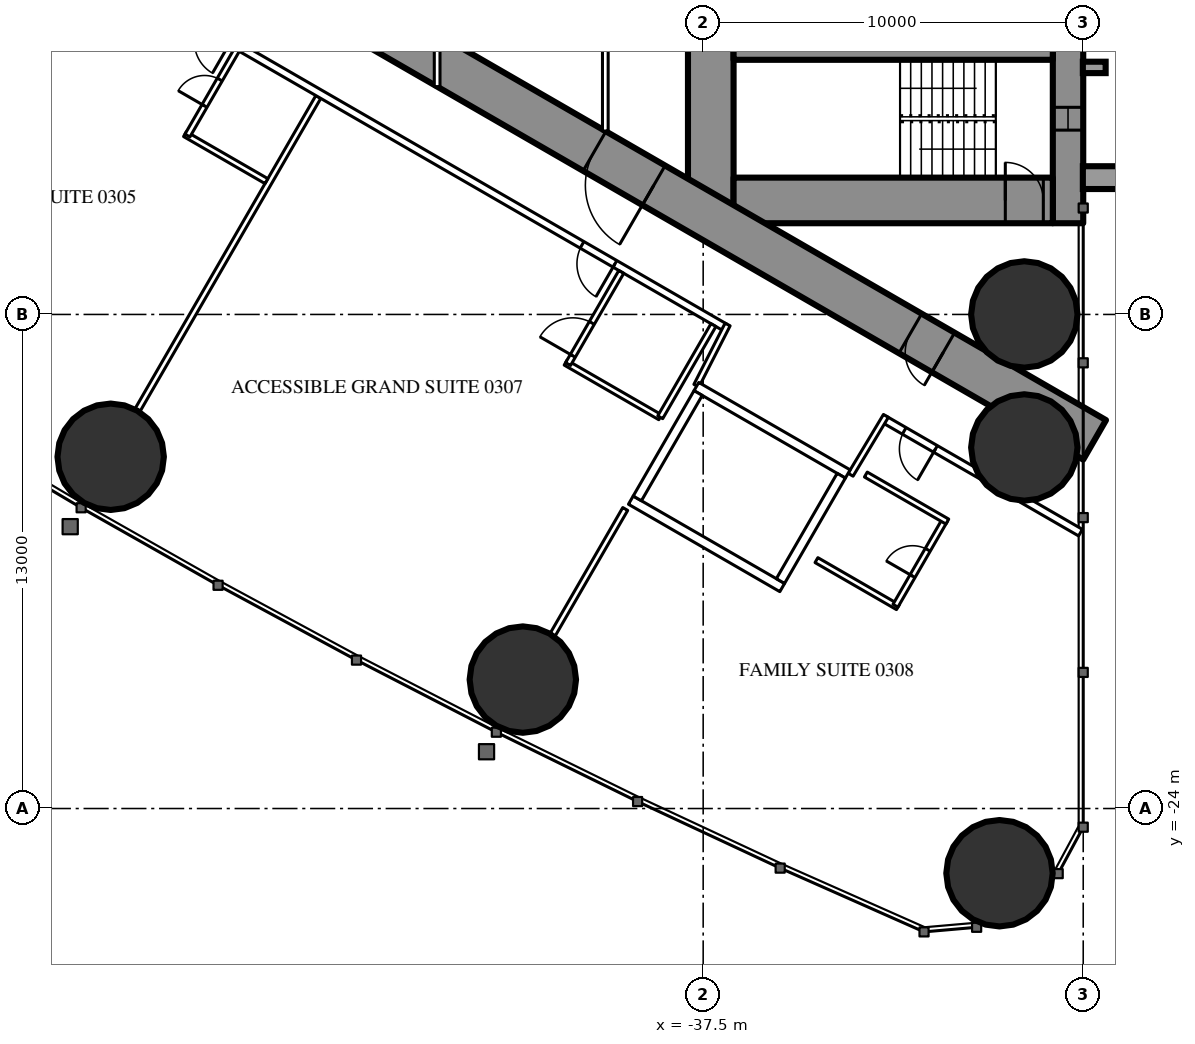
"""IFC4 building model, lengths in metres.
Left out: names, types, materials, properties, quantities, classifications, styles, units other than length and angle.
Written with IfcOpenShell. Run it as: python <this file> out.ifc"""

import sys

from ifc_helpers import new_model, si_unit, direction, frame, frame_2d, origin, origin_2d, place, context, subcontext, project, spatial, rectangle, hollow_circle, extrude, element, fill, save


model = new_model("IFC4")
c1 = context("Model", 3, precision=1e-05, world=origin(), true_north=direction((0.0, 1.0)))
c2 = subcontext(c1, "Body", "Model", "MODEL_VIEW")
j1 = project(units=[si_unit("LENGTHUNIT", "METRE"), si_unit("PLANEANGLEUNIT", "RADIAN")], contexts=[c1])
p1 = place(None, origin())
s1 = spatial("IfcSite", under=j1, at=p1, CompositionType="ELEMENT")
p2 = place(p1, origin())
s2 = spatial("IfcBuilding", under=s1, at=p2, CompositionType="ELEMENT")
p3 = place(p2, frame((0.0, 0.0, 18.0)))
s3 = spatial("IfcBuildingStorey", under=s2, at=p3, CompositionType="ELEMENT", Elevation=18.0)
for number, where, z_axis, x_axis in (
    (1, (-29.703, -25.703, 0.0), (0.0, 0.0, 1.0), (1.0, 0.0, 0.0)),
    (2, (-29.05, -11.0, 0.0), (0.0, 0.0, 1.0), (1.0, 0.0, 0.0)),
    (3, (-29.05, -14.5, 0.0), (0.0, 0.0, 1.0), (1.0, 0.0, 0.0)),
    (4, (-53.09, -14.745, 0.0), (0.0, 0.0, 1.0), (1.0, 0.0, 0.0)),
    (5, (-42.245, -20.607, 0.0), (0.0, 0.0, 1.0), (1.0, 0.0, 0.0)),
):
    element("IfcColumn", number, at=place(p3, frame(where, z_axis=z_axis, x_axis=x_axis)), inside=s3, PredefinedType="COLUMN", context=c2, shape_type="SweptSolid", body=[
        extrude(hollow_circle(Radius=1.4, WallThickness=0.12, at=origin_2d()), origin(), (0.0, 0.0, 1.0), 3.5),
    ])
p4 = place(p3, frame((-27.9, 8.6, 0.0), z_axis=(0.0, 0.0, 1.0), x_axis=(0.0, -1.0, 0.0)))
e6 = element("IfcWall", 6, at=p4, inside=s3, PredefinedType="SHEAR", context=c2, shape_type="SweptSolid", body=[
    extrude(rectangle(XDim=17.2, YDim=0.8, at=frame_2d((8.6, 0.0))), origin(), (0.0, 0.0, 1.0), 3.5),
])
p5 = place(p4, frame((2.45, 0.0, 0.6)))
e7 = element("IfcOpeningElement", 7, at=p5, cuts=e6, PredefinedType="OPENING", context=c2, shape_type="SweptSolid", body=[
    extrude(rectangle(XDim=0.6, YDim=2.1, at=frame_2d((0.3, 1.05))), frame((0.0, 0.41, 0.0), z_axis=(0.0, -1.0, 0.0), x_axis=(1.0, 0.0, 0.0)), (0.0, 0.0, 1.0), 0.82),
])
p6 = place(p4, frame((14.15, 0.0, 0.6)))
e8 = element("IfcOpeningElement", 8, at=p6, cuts=e6, PredefinedType="OPENING", context=c2, shape_type="SweptSolid", body=[
    extrude(rectangle(XDim=0.6, YDim=2.1, at=frame_2d((0.3, 1.05))), frame((0.0, 0.41, 0.0), z_axis=(0.0, -1.0, 0.0), x_axis=(1.0, 0.0, 0.0)), (0.0, 0.0, 1.0), 0.82),
])
p7 = place(p3, frame((-37.3, 8.6, 0.0), z_axis=(0.0, 0.0, 1.0), x_axis=(0.0, -1.0, 0.0)))
e9 = element("IfcWall", 9, at=p7, inside=s3, PredefinedType="SHEAR", context=c2, shape_type="SweptSolid", body=[
    extrude(rectangle(XDim=17.2, YDim=1.2, at=frame_2d((8.6, 0.0))), origin(), (0.0, 0.0, 1.0), 3.5),
])
p8 = place(p7, frame((7.7, 0.0, 0.0)))
e10 = element("IfcOpeningElement", 10, at=p8, cuts=e9, PredefinedType="OPENING", context=c2, shape_type="SweptSolid", body=[
    extrude(rectangle(XDim=1.8, YDim=2.2, at=frame_2d((0.9, 1.1))), frame((0.0, 0.61, 0.0), z_axis=(0.0, -1.0, 0.0), x_axis=(1.0, 0.0, 0.0)), (0.0, 0.0, 1.0), 1.22),
])
p9 = place(p3, frame((-28.3, -8.0, 0.0), z_axis=(0.0, 0.0, 1.0), x_axis=(-1.0, 0.0, 0.0)))
e11 = element("IfcWall", 11, at=p9, inside=s3, PredefinedType="SHEAR", context=c2, shape_type="SweptSolid", body=[
    extrude(rectangle(XDim=8.4, YDim=1.2, at=frame_2d((4.2, 0.0))), origin(), (0.0, 0.0, 1.0), 3.5),
])
p10 = place(p9, frame((0.25, 0.0, 0.0)))
e12 = element("IfcOpeningElement", 12, at=p10, cuts=e11, PredefinedType="OPENING", context=c2, shape_type="SweptSolid", body=[
    extrude(rectangle(XDim=1.0, YDim=2.2, at=frame_2d((0.5, 1.1))), frame((0.0, 0.61, 0.0), z_axis=(0.0, -1.0, 0.0), x_axis=(1.0, 0.0, 0.0)), (0.0, 0.0, 1.0), 1.22),
])
p11 = place(p3, frame((-28.3, -4.15, 0.0), z_axis=(0.0, 0.0, 1.0), x_axis=(-1.0, 0.0, 0.0)))
e13 = element("IfcWall", 13, at=p11, inside=s3, PredefinedType="SHEAR", context=c2, shape_type="SweptSolid", body=[
    extrude(rectangle(XDim=8.4, YDim=0.3, at=frame_2d((4.2, 0.0))), origin(), (0.0, 0.0, 1.0), 3.5),
])
p12 = place(p3, frame((-27.2, -14.3, 0.0), z_axis=(0.0, 0.0, 1.0), x_axis=(-0.866024021859, 0.500002393557, 0.0)))
e14 = element("IfcWall", 14, at=p12, inside=s3, PredefinedType="SHEAR", context=c2, shape_type="SweptSolid", body=[
    extrude(rectangle(XDim=27.907, YDim=1.2, at=frame_2d((13.954, 0.0))), origin(), (0.0, 0.0, 1.0), 3.5),
])
p13 = place(p12, frame((4.6, 0.0, 0.0)))
e15 = element("IfcOpeningElement", 15, at=p13, cuts=e14, PredefinedType="OPENING", context=c2, shape_type="SweptSolid", body=[
    extrude(rectangle(XDim=1.0, YDim=2.2, at=frame_2d((0.5, 1.1))), frame((0.0, 0.61, 0.0), z_axis=(0.0, -1.0, 0.0), x_axis=(1.0, 0.0, 0.0)), (0.0, 0.0, 1.0), 1.22),
])
p14 = place(p12, frame((13.395, 0.0, 0.0)))
e16 = element("IfcOpeningElement", 16, at=p14, cuts=e14, PredefinedType="OPENING", context=c2, shape_type="SweptSolid", body=[
    extrude(rectangle(XDim=1.8, YDim=2.2, at=frame_2d((0.9, 1.1))), frame((0.0, 0.61, 0.0), z_axis=(0.0, -1.0, 0.0), x_axis=(1.0, 0.0, 0.0)), (0.0, 0.0, 1.0), 1.22),
])
p15 = place(p3, frame((-47.627, -5.278, 0.0), z_axis=(0.0, 0.0, 1.0), x_axis=(-0.500009844318, -0.86601972009, 0.0)))
e17 = element("IfcWall", 17, at=p15, inside=s3, PredefinedType="PARTITIONING", context=c2, shape_type="SweptSolid", body=[
    extrude(rectangle(XDim=9.51, YDim=0.15, at=frame_2d((4.755, 0.0))), origin(), (0.0, 0.0, 1.0), 2.25),
])
p16 = place(p3, frame((-39.551, -16.118, 0.0), z_axis=(0.0, 0.0, 1.0), x_axis=(-0.499986503906, -0.866033195618, 0.0)))
e18 = element("IfcWall", 18, at=p16, inside=s3, PredefinedType="PARTITIONING", context=c2, shape_type="SweptSolid", body=[
    extrude(rectangle(XDim=3.815, YDim=0.15, at=frame_2d((1.907, 0.0))), origin(), (0.0, 0.0, 1.0), 3.25),
])
p17 = place(p3, frame((-27.572, -16.741, 0.0), z_axis=(0.0, 0.0, 1.0), x_axis=(-0.866024464444, 0.500001626982, 0.0)))
e19 = element("IfcWall", 19, at=p17, inside=s3, PredefinedType="PARTITIONING", context=c2, shape_type="SweptSolid", body=[
    extrude(rectangle(XDim=5.955, YDim=0.2, at=frame_2d((2.978, 0.0))), origin(), (0.0, 0.0, 1.0), 3.25),
])
p18 = place(p17, frame((4.405, 0.0, 0.0)))
e20 = element("IfcOpeningElement", 20, at=p18, cuts=e19, PredefinedType="OPENING", context=c2, shape_type="SweptSolid", body=[
    extrude(rectangle(XDim=0.95, YDim=2.2, at=frame_2d((0.475, 1.1))), frame((0.0, 0.11, 0.0), z_axis=(0.0, -1.0, 0.0), x_axis=(1.0, 0.0, 0.0)), (0.0, 0.0, 1.0), 0.22),
])
p19 = place(p3, frame((-36.92, -11.344, 0.0), z_axis=(0.0, 0.0, 1.0), x_axis=(-0.866028313256, 0.499994960614, 0.0)))
e21 = element("IfcWall", 21, at=p19, inside=s3, PredefinedType="PARTITIONING", context=c2, shape_type="SweptSolid", body=[
    extrude(rectangle(XDim=22.568, YDim=0.2, at=frame_2d((11.284, 0.0))), origin(), (0.0, 0.0, 1.0), 3.25),
])
p20 = place(p19, frame((15.03, 0.0, 0.0)))
e22 = element("IfcOpeningElement", 22, at=p20, cuts=e21, PredefinedType="OPENING", context=c2, shape_type="SweptSolid", body=[
    extrude(rectangle(XDim=0.95, YDim=2.2, at=frame_2d((0.475, 1.1))), frame((0.0, 0.11, 0.0), z_axis=(0.0, -1.0, 0.0), x_axis=(1.0, 0.0, 0.0)), (0.0, 0.0, 1.0), 0.22),
])
p21 = place(p19, frame((3.35, 0.0, 0.0)))
e23 = element("IfcOpeningElement", 23, at=p21, cuts=e21, PredefinedType="OPENING", context=c2, shape_type="SweptSolid", body=[
    extrude(rectangle(XDim=1.0, YDim=2.2, at=frame_2d((0.5, 1.1))), frame((0.0, 0.11, 0.0), z_axis=(0.0, -1.0, 0.0), x_axis=(1.0, 0.0, 0.0)), (0.0, 0.0, 1.0), 0.22),
])
p22 = place(p3, frame((-36.857, -11.265, 0.0), z_axis=(0.0, 0.0, 1.0), x_axis=(-0.454225294761, -0.890886851176, 0.0)))
e24 = element("IfcWall", 24, at=p22, inside=s3, PredefinedType="PARTITIONING", context=c2, shape_type="SweptSolid", body=[
    extrude(rectangle(XDim=1.807, YDim=0.15, at=frame_2d((0.904, 0.0))), origin(), (0.0, 0.0, 1.0), 3.25),
])
p23 = place(p3, frame((-33.621, -15.218, 0.0), z_axis=(0.0, 0.0, 1.0), x_axis=(0.514336634837, 0.857588377991, 0.0)))
e25 = element("IfcWall", 25, at=p23, inside=s3, PredefinedType="PARTITIONING", context=c2, shape_type="SweptSolid", body=[
    extrude(rectangle(XDim=1.805, YDim=0.15, at=frame_2d((0.903, 0.0))), origin(), (0.0, 0.0, 1.0), 3.25),
])
p24 = place(p3, frame((-48.992, -7.492, 0.0), z_axis=(0.0, 0.0, 1.0), x_axis=(-0.866031185235, 0.4999899861, 0.0)))
e26 = element("IfcWall", 26, at=p24, inside=s3, PredefinedType="PARTITIONING", context=c2, shape_type="SweptSolid", body=[
    extrude(rectangle(XDim=2.475, YDim=0.15, at=frame_2d((1.238, 0.0))), origin(), (0.0, 0.0, 1.0), 3.25),
])
p25 = place(p3, frame((-49.77, -4.04, 0.0), z_axis=(0.0, 0.0, 1.0), x_axis=(-0.500006934395, -0.866021400173, 0.0)))
e27 = element("IfcWall", 27, at=p25, inside=s3, PredefinedType="PARTITIONING", context=c2, shape_type="SweptSolid", body=[
    extrude(rectangle(XDim=2.6, YDim=0.15, at=frame_2d((1.3, 0.0))), origin(), (0.0, 0.0, 1.0), 3.25),
])
p26 = place(p25, frame((0.9, 0.0, 0.0)))
e28 = element("IfcOpeningElement", 28, at=p26, cuts=e27, PredefinedType="OPENING", context=c2, shape_type="SweptSolid", body=[
    extrude(rectangle(XDim=0.8, YDim=2.2, at=frame_2d((0.4, 1.1))), frame((0.0, 0.085, 0.0), z_axis=(0.0, -1.0, 0.0), x_axis=(1.0, 0.0, 0.0)), (0.0, 0.0, 1.0), 0.17),
])
p27 = place(p3, frame((-38.63, -13.705, 0.0), z_axis=(0.0, 0.0, 1.0), x_axis=(-0.866018712932, 0.500011588718, 0.0)))
e29 = element("IfcWall", 29, at=p27, inside=s3, PredefinedType="PARTITIONING", context=c2, shape_type="SweptSolid", body=[
    extrude(rectangle(XDim=2.875, YDim=0.15, at=frame_2d((1.438, 0.0))), origin(), (0.0, 0.0, 1.0), 3.25),
])
p28 = place(p3, frame((-39.655, -9.88, 0.0), z_axis=(0.0, 0.0, 1.0), x_axis=(-0.500049511043, -0.865996816683, 0.0)))
e30 = element("IfcWall", 30, at=p28, inside=s3, PredefinedType="PARTITIONING", context=c2, shape_type="SweptSolid", body=[
    extrude(rectangle(XDim=2.8, YDim=0.15, at=frame_2d((1.4, 0.0))), origin(), (0.0, 0.0, 1.0), 3.25),
])
p29 = place(p28, frame((1.55, 0.0, 0.0)))
e31 = element("IfcOpeningElement", 31, at=p29, cuts=e30, PredefinedType="OPENING", context=c2, shape_type="SweptSolid", body=[
    extrude(rectangle(XDim=1.0, YDim=2.2, at=frame_2d((0.5, 1.1))), frame((0.0, 0.085, 0.0), z_axis=(0.0, -1.0, 0.0), x_axis=(1.0, 0.0, 0.0)), (0.0, 0.0, 1.0), 0.17),
])
p30 = place(p3, frame((-37.23, -11.281, 0.0), z_axis=(0.0, 0.0, 1.0), x_axis=(-0.500049511043, -0.865996816683, 0.0)))
e32 = element("IfcWall", 32, at=p30, inside=s3, PredefinedType="PARTITIONING", context=c2, shape_type="SweptSolid", body=[
    extrude(rectangle(XDim=2.8, YDim=0.15, at=frame_2d((1.4, 0.0))), origin(), (0.0, 0.0, 1.0), 3.25),
])
p31 = place(p3, frame((-32.376, -18.702, 0.0), z_axis=(0.0, 0.0, 1.0), x_axis=(-0.866006523861, 0.500032699561, 0.0)))
e33 = element("IfcWall", 33, at=p31, inside=s3, PredefinedType="PARTITIONING", context=c2, shape_type="SweptSolid", body=[
    extrude(rectangle(XDim=2.475, YDim=0.15, at=frame_2d((1.237, 0.0))), origin(), (0.0, 0.0, 1.0), 3.25),
])
p32 = place(p3, frame((-31.141, -16.413, 0.0), z_axis=(0.0, 0.0, 1.0), x_axis=(-0.500006934395, -0.866021400173, 0.0)))
e34 = element("IfcWall", 34, at=p32, inside=s3, PredefinedType="PARTITIONING", context=c2, shape_type="SweptSolid", body=[
    extrude(rectangle(XDim=2.6, YDim=0.15, at=frame_2d((1.3, 0.0))), origin(), (0.0, 0.0, 1.0), 3.25),
])
p33 = place(p32, frame((0.9, 0.0, 0.0)))
e35 = element("IfcOpeningElement", 35, at=p33, cuts=e34, PredefinedType="OPENING", context=c2, shape_type="SweptSolid", body=[
    extrude(rectangle(XDim=0.8, YDim=2.2, at=frame_2d((0.4, 1.1))), frame((0.0, 0.085, 0.0), z_axis=(0.0, -1.0, 0.0), x_axis=(1.0, 0.0, 0.0)), (0.0, 0.0, 1.0), 0.17),
])
p34 = place(p3, frame((-31.076, -16.45, 0.0), z_axis=(0.0, 0.0, 1.0), x_axis=(-0.866073894602, 0.499916002032, 0.0)))
e36 = element("IfcWall", 36, at=p34, inside=s3, PredefinedType="PARTITIONING", context=c2, shape_type="SweptSolid", body=[
    extrude(rectangle(XDim=2.475, YDim=0.15, at=frame_2d((1.238, 0.0))), origin(), (0.0, 0.0, 1.0), 3.25),
])
p35 = place(p3, frame((-40.075, 1.2, 0.0), z_axis=(0.0, 0.0, 1.0), x_axis=(0.0, -1.0, 0.0)))
e37 = element("IfcWall", 37, at=p35, inside=s3, PredefinedType="PARTITIONING", context=c2, shape_type="SweptSolid", body=[
    extrude(rectangle(XDim=7.374, YDim=0.15, at=frame_2d((3.687, 0.0))), origin(), (0.0, 0.0, 1.0), 3.25),
])
p36 = place(p35, frame((2.787, 0.0, 0.0)))
e38 = element("IfcOpeningElement", 38, at=p36, cuts=e37, PredefinedType="OPENING", context=c2, shape_type="SweptSolid", body=[
    extrude(rectangle(XDim=1.8, YDim=2.2, at=frame_2d((0.9, 1.1))), frame((0.0, 0.085, 0.0), z_axis=(0.0, -1.0, 0.0), x_axis=(1.0, 0.0, 0.0)), (0.0, 0.0, 1.0), 0.17),
])
p37 = place(p3, frame((-44.5, 5.005, 0.0), z_axis=(0.0, 0.0, 1.0), x_axis=(0.0, -1.0, 0.0)))
e39 = element("IfcWall", 39, at=p37, inside=s3, PredefinedType="PARTITIONING", context=c2, shape_type="SweptSolid", body=[
    extrude(rectangle(XDim=10.009, YDim=0.15, at=frame_2d((5.005, 0.0))), origin(), (0.0, 0.0, 1.0), 2.35),
])
p38 = place(p37, frame((2.002, 0.0, 0.0)))
e40 = element("IfcOpeningElement", 40, at=p38, cuts=e39, PredefinedType="OPENING", context=c2, shape_type="SweptSolid", body=[
    extrude(rectangle(XDim=1.0, YDim=2.2, at=frame_2d((0.5, 1.1))), frame((0.0, 0.085, 0.0), z_axis=(0.0, -1.0, 0.0), x_axis=(1.0, 0.0, 0.0)), (0.0, 0.0, 1.0), 0.17),
])
p39 = place(p37, frame((7.007, 0.0, 0.0)))
e41 = element("IfcOpeningElement", 41, at=p39, cuts=e39, PredefinedType="OPENING", context=c2, shape_type="SweptSolid", body=[
    extrude(rectangle(XDim=1.0, YDim=2.2, at=frame_2d((0.5, 1.1))), frame((0.0, 0.085, 0.0), z_axis=(0.0, -1.0, 0.0), x_axis=(1.0, 0.0, 0.0)), (0.0, 0.0, 1.0), 0.17),
])
p40 = place(p3, frame((-33.696, -15.197, 0.0), z_axis=(0.0, 0.0, 1.0), x_axis=(-0.865976953817, 0.500083908417, 0.0)))
e42 = element("IfcWall", 42, at=p40, inside=s3, PredefinedType="PARTITIONING", context=c2, shape_type="SweptSolid", body=[
    extrude(rectangle(XDim=4.599, YDim=0.25, at=frame_2d((2.3, 0.0))), origin(), (0.0, 0.0, 1.0), 3.25),
])
p41 = place(p3, frame((-35.42, -18.186, 0.0), z_axis=(0.0, 0.0, 1.0), x_axis=(-0.865990227814, 0.50006092162, 0.0)))
e43 = element("IfcWall", 43, at=p41, inside=s3, PredefinedType="PARTITIONING", context=c2, shape_type="SweptSolid", body=[
    extrude(rectangle(XDim=4.6, YDim=0.25, at=frame_2d((2.3, 0.0))), origin(), (0.0, 0.0, 1.0), 3.25),
])
p42 = place(p3, frame((-33.866, -15.243, 0.0), z_axis=(0.0, 0.0, 1.0), x_axis=(-0.499929347863, -0.866066190972, 0.0)))
e44 = element("IfcWall", 44, at=p42, inside=s3, PredefinedType="PARTITIONING", context=c2, shape_type="SweptSolid", body=[
    extrude(rectangle(XDim=3.201, YDim=0.25, at=frame_2d((1.6, 0.0))), origin(), (0.0, 0.0, 1.0), 3.25),
])
p43 = place(p3, frame((-37.633, -13.068, 0.0), z_axis=(0.0, 0.0, 1.0), x_axis=(-0.499872130319, -0.866099216793, 0.0)))
e45 = element("IfcWall", 45, at=p43, inside=s3, PredefinedType="PARTITIONING", context=c2, shape_type="SweptSolid", body=[
    extrude(rectangle(XDim=3.2, YDim=0.25, at=frame_2d((1.6, 0.0))), origin(), (0.0, 0.0, 1.0), 3.25),
])
p44 = place(p26, origin())
e46 = element("IfcDoor", 46, at=p44, inside=s3, OperationType="SINGLE_SWING_RIGHT", PredefinedType="DOOR", context=c2, shape_type="SweptSolid", body=[
    extrude(rectangle(XDim=0.8, YDim=2.2, at=frame_2d((0.4, 1.1))), frame((0.0, 0.025, 0.0), z_axis=(0.0, -1.0, 0.0), x_axis=(1.0, 0.0, 0.0)), (0.0, 0.0, 1.0), 0.05),
])
fill(e28, e46)
p45 = place(p29, origin())
e47 = element("IfcDoor", 47, at=p45, inside=s3, OperationType="SINGLE_SWING_RIGHT", PredefinedType="DOOR", context=c2, shape_type="SweptSolid", body=[
    extrude(rectangle(XDim=1.0, YDim=2.2, at=frame_2d((0.5, 1.1))), frame((0.0, 0.025, 0.0), z_axis=(0.0, -1.0, 0.0), x_axis=(1.0, 0.0, 0.0)), (0.0, 0.0, 1.0), 0.05),
])
fill(e31, e47)
p46 = place(p21, origin())
e48 = element("IfcDoor", 48, at=p46, inside=s3, OperationType="SINGLE_SWING_LEFT", PredefinedType="DOOR", context=c2, shape_type="SweptSolid", body=[
    extrude(rectangle(XDim=1.0, YDim=2.2, at=frame_2d((0.5, 1.1))), frame((0.0, 0.025, 0.0), z_axis=(0.0, -1.0, 0.0), x_axis=(1.0, 0.0, 0.0)), (0.0, 0.0, 1.0), 0.05),
])
fill(e23, e48)
p47 = place(p33, origin())
e49 = element("IfcDoor", 49, at=p47, inside=s3, OperationType="SINGLE_SWING_RIGHT", PredefinedType="DOOR", context=c2, shape_type="SweptSolid", body=[
    extrude(rectangle(XDim=0.8, YDim=2.2, at=frame_2d((0.4, 1.1))), frame((0.0, 0.025, 0.0), z_axis=(0.0, -1.0, 0.0), x_axis=(1.0, 0.0, 0.0)), (0.0, 0.0, 1.0), 0.05),
])
fill(e35, e49)
p48 = place(p18, origin())
e50 = element("IfcDoor", 50, at=p48, inside=s3, OperationType="SINGLE_SWING_LEFT", PredefinedType="DOOR", context=c2, shape_type="SweptSolid", body=[
    extrude(rectangle(XDim=0.95, YDim=2.2, at=frame_2d((0.475, 1.1))), frame((0.0, 0.025, 0.0), z_axis=(0.0, -1.0, 0.0), x_axis=(1.0, 0.0, 0.0)), (0.0, 0.0, 1.0), 0.05),
])
fill(e20, e50)
p49 = place(p13, origin())
e51 = element("IfcDoor", 51, at=p49, inside=s3, OperationType="SINGLE_SWING_LEFT", PredefinedType="DOOR", context=c2, shape_type="SweptSolid", body=[
    extrude(rectangle(XDim=1.0, YDim=2.2, at=frame_2d((0.5, 1.1))), frame((0.0, 0.025, 0.0), z_axis=(0.0, -1.0, 0.0), x_axis=(1.0, 0.0, 0.0)), (0.0, 0.0, 1.0), 0.05),
])
fill(e15, e51)
p50 = place(p14, origin())
e52 = element("IfcDoor", 52, at=p50, inside=s3, OperationType="DOUBLE_DOOR_SINGLE_SWING", PredefinedType="DOOR", context=c2, shape_type="SweptSolid", body=[
    extrude(rectangle(XDim=1.8, YDim=2.2, at=frame_2d((0.9, 1.1))), frame((0.0, 0.025, 0.0), z_axis=(0.0, -1.0, 0.0), x_axis=(1.0, 0.0, 0.0)), (0.0, 0.0, 1.0), 0.05),
])
fill(e16, e52)
p51 = place(p10, origin())
e53 = element("IfcDoor", 53, at=p51, inside=s3, OperationType="SINGLE_SWING_RIGHT", PredefinedType="DOOR", context=c2, shape_type="SweptSolid", body=[
    extrude(rectangle(XDim=1.0, YDim=2.2, at=frame_2d((0.5, 1.1))), frame((0.0, 0.025, 0.0), z_axis=(0.0, -1.0, 0.0), x_axis=(1.0, 0.0, 0.0)), (0.0, 0.0, 1.0), 0.05),
])
fill(e12, e53)
p52 = place(p6, origin())
e54 = element("IfcWindow", 54, at=p52, inside=s3, PartitioningType="SINGLE_PANEL", PredefinedType="WINDOW", context=c2, shape_type="SweptSolid", body=[
    extrude(rectangle(XDim=0.6, YDim=2.1, at=frame_2d((0.3, 1.05))), frame((0.0, 0.03, 0.0), z_axis=(0.0, -1.0, 0.0), x_axis=(1.0, 0.0, 0.0)), (0.0, 0.0, 1.0), 0.06),
])
fill(e8, e54)
save(model, sys.argv[1])
